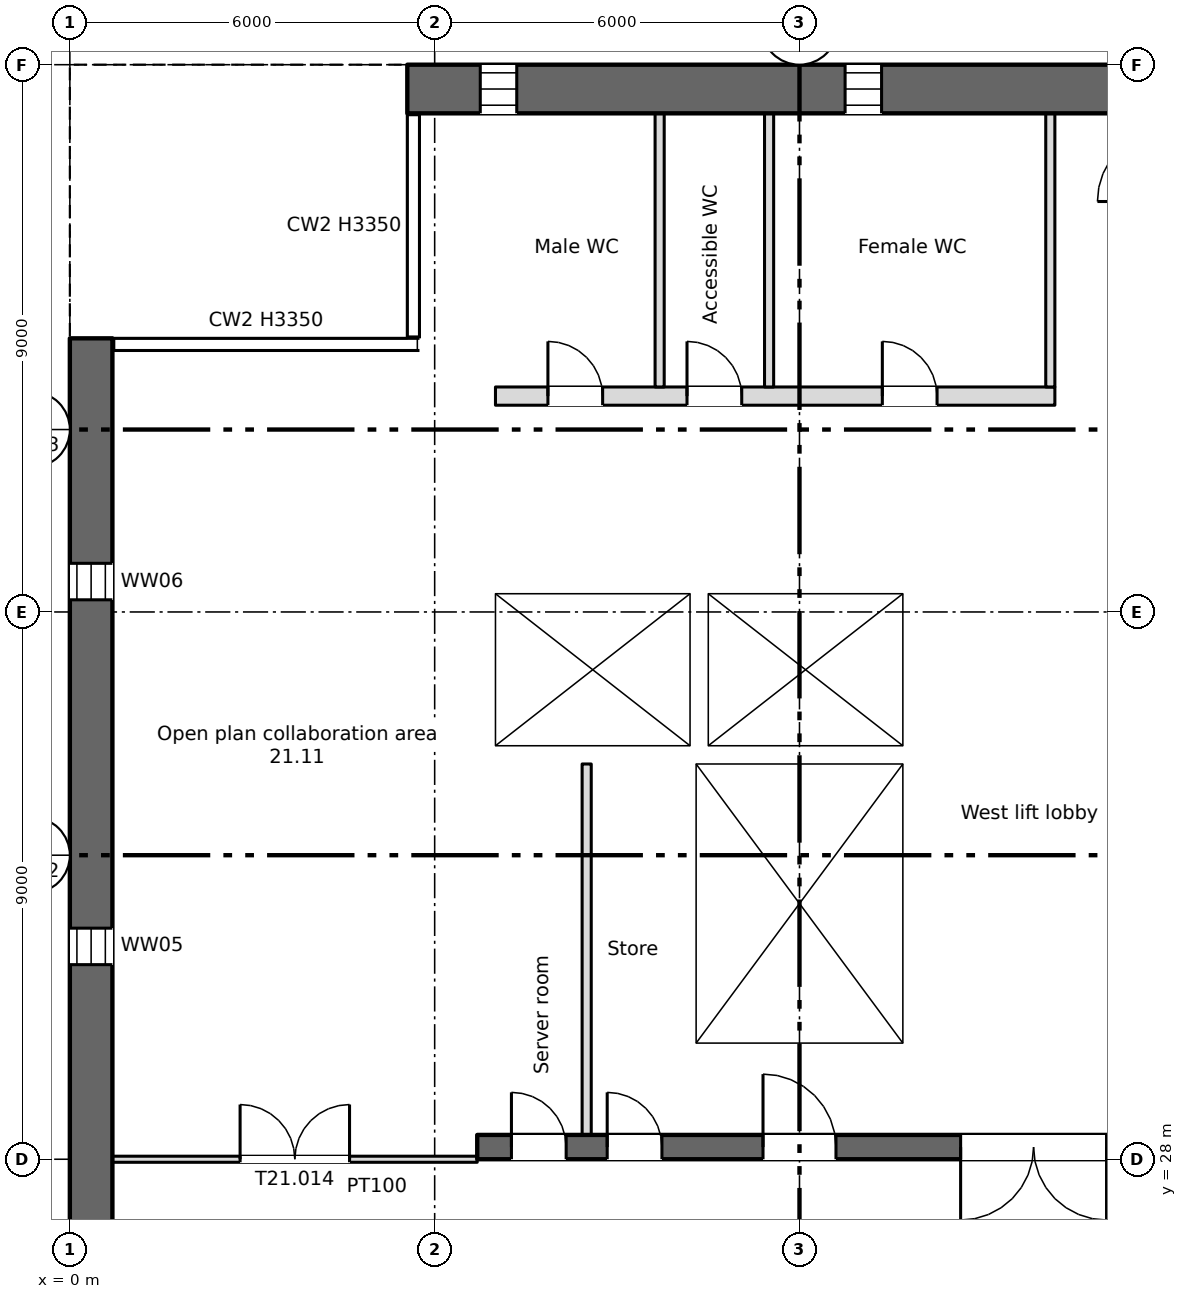
"""IFC4 building model, lengths in metres.
Left out: names, types, materials, properties, quantities, classifications, styles, units other than length and angle.
Written with IfcOpenShell. Run it as: python <this file> out.ifc"""

import sys

from ifc_helpers import new_model, si_unit, direction, frame, frame_2d, origin, place, context, subcontext, project, spatial, rectangle, extrude, element, fill, save


model = new_model("IFC4")
c1 = context("Model", 3, precision=1e-05, world=origin(), true_north=direction((0.0, 1.0)))
c2 = subcontext(c1, "Body", "Model", "MODEL_VIEW")
j1 = project(units=[si_unit("LENGTHUNIT", "METRE"), si_unit("PLANEANGLEUNIT", "RADIAN")], contexts=[c1])
p1 = place(None, origin())
s1 = spatial("IfcSite", under=j1, at=p1, CompositionType="ELEMENT")
p2 = place(p1, origin())
s2 = spatial("IfcBuilding", under=s1, at=p2, CompositionType="ELEMENT")
p3 = place(p2, frame((0.0, 0.0, 136.25)))
s3 = spatial("IfcBuildingStorey", under=s2, at=p3, CompositionType="ELEMENT", Elevation=136.25)
p4 = place(p3, frame((0.35, 6.0, 0.0), z_axis=(0.0, 0.0, 1.0), x_axis=(0.0, 1.0, 0.0)))
e1 = element("IfcWall", 1, at=p4, inside=s3, PredefinedType="SHEAR", context=c2, shape_type="SweptSolid", body=[
    extrude(rectangle(XDim=35.5, YDim=0.7, at=frame_2d((17.75, 0.0))), origin(), (0.0, 0.0, 1.0), 3.35),
])
p5 = place(p4, frame((1.2, 0.0, 0.6)))
e2 = element("IfcOpeningElement", 2, at=p5, cuts=e1, PredefinedType="OPENING", context=c2, shape_type="SweptSolid", body=[
    extrude(rectangle(XDim=0.6, YDim=2.4, at=frame_2d((0.3, 1.2))), frame((0.0, 0.36, 0.0), z_axis=(0.0, -1.0, 0.0), x_axis=(1.0, 0.0, 0.0)), (0.0, 0.0, 1.0), 0.72),
])
p6 = place(p4, frame((7.2, 0.0, 0.6)))
e3 = element("IfcOpeningElement", 3, at=p6, cuts=e1, PredefinedType="OPENING", context=c2, shape_type="SweptSolid", body=[
    extrude(rectangle(XDim=0.6, YDim=2.4, at=frame_2d((0.3, 1.2))), frame((0.0, 0.36, 0.0), z_axis=(0.0, -1.0, 0.0), x_axis=(1.0, 0.0, 0.0)), (0.0, 0.0, 1.0), 0.72),
])
p7 = place(p4, frame((13.2, 0.0, 0.6)))
e4 = element("IfcOpeningElement", 4, at=p7, cuts=e1, PredefinedType="OPENING", context=c2, shape_type="SweptSolid", body=[
    extrude(rectangle(XDim=0.6, YDim=2.4, at=frame_2d((0.3, 1.2))), frame((0.0, 0.36, 0.0), z_axis=(0.0, -1.0, 0.0), x_axis=(1.0, 0.0, 0.0)), (0.0, 0.0, 1.0), 0.72),
])
p8 = place(p4, frame((19.2, 0.0, 0.6)))
e5 = element("IfcOpeningElement", 5, at=p8, cuts=e1, PredefinedType="OPENING", context=c2, shape_type="SweptSolid", body=[
    extrude(rectangle(XDim=0.6, YDim=2.4, at=frame_2d((0.3, 1.2))), frame((0.0, 0.36, 0.0), z_axis=(0.0, -1.0, 0.0), x_axis=(1.0, 0.0, 0.0)), (0.0, 0.0, 1.0), 0.72),
])
p9 = place(p4, frame((25.2, 0.0, 0.6)))
e6 = element("IfcOpeningElement", 6, at=p9, cuts=e1, PredefinedType="OPENING", context=c2, shape_type="SweptSolid", body=[
    extrude(rectangle(XDim=0.6, YDim=2.4, at=frame_2d((0.3, 1.2))), frame((0.0, 0.36, 0.0), z_axis=(0.0, -1.0, 0.0), x_axis=(1.0, 0.0, 0.0)), (0.0, 0.0, 1.0), 0.72),
])
p10 = place(p4, frame((31.2, 0.0, 0.6)))
e7 = element("IfcOpeningElement", 7, at=p10, cuts=e1, PredefinedType="OPENING", context=c2, shape_type="SweptSolid", body=[
    extrude(rectangle(XDim=0.6, YDim=2.4, at=frame_2d((0.3, 1.2))), frame((0.0, 0.36, 0.0), z_axis=(0.0, -1.0, 0.0), x_axis=(1.0, 0.0, 0.0)), (0.0, 0.0, 1.0), 0.72),
])
p11 = place(p3, frame((5.55, 45.6, 0.0), z_axis=(0.0, 0.0, 1.0), x_axis=(1.0, 0.0, 0.0)))
e8 = element("IfcWall", 8, at=p11, inside=s3, PredefinedType="SHEAR", context=c2, shape_type="SweptSolid", body=[
    extrude(rectangle(XDim=60.9, YDim=0.8, at=frame_2d((30.45, 0.0))), origin(), (0.0, 0.0, 1.0), 3.35),
])
p12 = place(p11, frame((1.2, 0.0, 0.6)))
e9 = element("IfcOpeningElement", 9, at=p12, cuts=e8, PredefinedType="OPENING", context=c2, shape_type="SweptSolid", body=[
    extrude(rectangle(XDim=0.6, YDim=2.4, at=frame_2d((0.3, 1.2))), frame((0.0, 0.41, 0.0), z_axis=(0.0, -1.0, 0.0), x_axis=(1.0, 0.0, 0.0)), (0.0, 0.0, 1.0), 0.82),
])
p13 = place(p11, frame((7.2, 0.0, 0.6)))
e10 = element("IfcOpeningElement", 10, at=p13, cuts=e8, PredefinedType="OPENING", context=c2, shape_type="SweptSolid", body=[
    extrude(rectangle(XDim=0.6, YDim=2.4, at=frame_2d((0.3, 1.2))), frame((0.0, 0.41, 0.0), z_axis=(0.0, -1.0, 0.0), x_axis=(1.0, 0.0, 0.0)), (0.0, 0.0, 1.0), 0.82),
])
p14 = place(p11, frame((55.2, 0.0, 0.6)))
e11 = element("IfcOpeningElement", 11, at=p14, cuts=e8, PredefinedType="OPENING", context=c2, shape_type="SweptSolid", body=[
    extrude(rectangle(XDim=0.6, YDim=2.4, at=frame_2d((0.3, 1.2))), frame((0.0, 0.41, 0.0), z_axis=(0.0, -1.0, 0.0), x_axis=(1.0, 0.0, 0.0)), (0.0, 0.0, 1.0), 0.82),
])
p15 = place(p3, frame((6.7, 28.2, 0.0), z_axis=(0.0, 0.0, 1.0), x_axis=(1.0, 0.0, 0.0)))
e12 = element("IfcWall", 12, at=p15, inside=s3, PredefinedType="SHEAR", context=c2, shape_type="SweptSolid", body=[
    extrude(rectangle(XDim=57.8, YDim=0.4, at=frame_2d((28.9, 0.0))), origin(), (0.0, 0.0, 1.0), 3.35),
])
p16 = place(p15, frame((12.812, 0.0, 0.0)))
e13 = element("IfcOpeningElement", 13, at=p16, cuts=e12, PredefinedType="OPENING", context=c2, shape_type="SweptSolid", body=[
    extrude(rectangle(XDim=0.9, YDim=2.1, at=frame_2d((0.45, 1.05))), frame((0.0, 0.21, 0.0), z_axis=(0.0, -1.0, 0.0), x_axis=(1.0, 0.0, 0.0)), (0.0, 0.0, 1.0), 0.42),
])
p17 = place(p15, frame((15.387, 0.0, 0.0)))
e14 = element("IfcOpeningElement", 14, at=p17, cuts=e12, PredefinedType="OPENING", context=c2, shape_type="SweptSolid", body=[
    extrude(rectangle(XDim=0.9, YDim=2.1, at=frame_2d((0.45, 1.05))), frame((0.0, 0.21, 0.0), z_axis=(0.0, -1.0, 0.0), x_axis=(1.0, 0.0, 0.0)), (0.0, 0.0, 1.0), 0.42),
])
p18 = place(p15, frame((48.312, 0.0, 0.0)))
e15 = element("IfcOpeningElement", 15, at=p18, cuts=e12, PredefinedType="OPENING", context=c2, shape_type="SweptSolid", body=[
    extrude(rectangle(XDim=0.9, YDim=2.1, at=frame_2d((0.45, 1.05))), frame((0.0, 0.21, 0.0), z_axis=(0.0, -1.0, 0.0), x_axis=(1.0, 0.0, 0.0)), (0.0, 0.0, 1.0), 0.42),
])
p19 = place(p15, frame((50.887, 0.0, 0.0)))
e16 = element("IfcOpeningElement", 16, at=p19, cuts=e12, PredefinedType="OPENING", context=c2, shape_type="SweptSolid", body=[
    extrude(rectangle(XDim=0.9, YDim=2.1, at=frame_2d((0.45, 1.05))), frame((0.0, 0.21, 0.0), z_axis=(0.0, -1.0, 0.0), x_axis=(1.0, 0.0, 0.0)), (0.0, 0.0, 1.0), 0.42),
])
p20 = place(p15, frame((0.562, 0.0, 0.0)))
e17 = element("IfcOpeningElement", 17, at=p20, cuts=e12, PredefinedType="OPENING", context=c2, shape_type="SweptSolid", body=[
    extrude(rectangle(XDim=0.9, YDim=2.1, at=frame_2d((0.45, 1.05))), frame((0.0, 0.21, 0.0), z_axis=(0.0, -1.0, 0.0), x_axis=(1.0, 0.0, 0.0)), (0.0, 0.0, 1.0), 0.42),
])
p21 = place(p15, frame((2.137, 0.0, 0.0)))
e18 = element("IfcOpeningElement", 18, at=p21, cuts=e12, PredefinedType="OPENING", context=c2, shape_type="SweptSolid", body=[
    extrude(rectangle(XDim=0.9, YDim=2.1, at=frame_2d((0.45, 1.05))), frame((0.0, 0.21, 0.0), z_axis=(0.0, -1.0, 0.0), x_axis=(1.0, 0.0, 0.0)), (0.0, 0.0, 1.0), 0.42),
])
p22 = place(p15, frame((4.7, 0.0, 0.0)))
e19 = element("IfcOpeningElement", 19, at=p22, cuts=e12, PredefinedType="OPENING", context=c2, shape_type="SweptSolid", body=[
    extrude(rectangle(XDim=1.2, YDim=2.1, at=frame_2d((0.6, 1.05))), frame((0.0, 0.21, 0.0), z_axis=(0.0, -1.0, 0.0), x_axis=(1.0, 0.0, 0.0)), (0.0, 0.0, 1.0), 0.42),
])
p23 = place(p15, frame((31.7, 0.0, 0.0)))
e20 = element("IfcOpeningElement", 20, at=p23, cuts=e12, PredefinedType="OPENING", context=c2, shape_type="SweptSolid", body=[
    extrude(rectangle(XDim=1.2, YDim=2.1, at=frame_2d((0.6, 1.05))), frame((0.0, 0.21, 0.0), z_axis=(0.0, -1.0, 0.0), x_axis=(1.0, 0.0, 0.0)), (0.0, 0.0, 1.0), 0.42),
])
p24 = place(p15, frame((55.2, 0.0, 0.0)))
e21 = element("IfcOpeningElement", 21, at=p24, cuts=e12, PredefinedType="OPENING", context=c2, shape_type="SweptSolid", body=[
    extrude(rectangle(XDim=1.2, YDim=2.1, at=frame_2d((0.6, 1.05))), frame((0.0, 0.21, 0.0), z_axis=(0.0, -1.0, 0.0), x_axis=(1.0, 0.0, 0.0)), (0.0, 0.0, 1.0), 0.42),
])
p25 = place(p15, frame((21.7, 0.0, 0.0)))
e22 = element("IfcOpeningElement", 22, at=p25, cuts=e12, PredefinedType="OPENING", context=c2, shape_type="SweptSolid", body=[
    extrude(rectangle(XDim=1.2, YDim=2.1, at=frame_2d((0.6, 1.05))), frame((0.0, 0.21, 0.0), z_axis=(0.0, -1.0, 0.0), x_axis=(1.0, 0.0, 0.0)), (0.0, 0.0, 1.0), 0.42),
])
p26 = place(p15, frame((41.7, 0.0, 0.0)))
e23 = element("IfcOpeningElement", 23, at=p26, cuts=e12, PredefinedType="OPENING", context=c2, shape_type="SweptSolid", body=[
    extrude(rectangle(XDim=1.2, YDim=2.1, at=frame_2d((0.6, 1.05))), frame((0.0, 0.21, 0.0), z_axis=(0.0, -1.0, 0.0), x_axis=(1.0, 0.0, 0.0)), (0.0, 0.0, 1.0), 0.42),
])
p27 = place(p15, frame((24.85, 0.0, 0.0)))
e24 = element("IfcOpeningElement", 24, at=p27, cuts=e12, PredefinedType="OPENING", context=c2, shape_type="SweptSolid", body=[
    extrude(rectangle(XDim=2.4, YDim=2.1, at=frame_2d((1.2, 1.05))), frame((0.0, 0.21, 0.0), z_axis=(0.0, -1.0, 0.0), x_axis=(1.0, 0.0, 0.0)), (0.0, 0.0, 1.0), 0.42),
])
p28 = place(p15, frame((37.35, 0.0, 0.0)))
e25 = element("IfcOpeningElement", 25, at=p28, cuts=e12, PredefinedType="OPENING", context=c2, shape_type="SweptSolid", body=[
    extrude(rectangle(XDim=2.4, YDim=2.1, at=frame_2d((1.2, 1.05))), frame((0.0, 0.21, 0.0), z_axis=(0.0, -1.0, 0.0), x_axis=(1.0, 0.0, 0.0)), (0.0, 0.0, 1.0), 0.42),
])
p29 = place(p15, frame((7.95, 0.0, 0.0)))
e26 = element("IfcOpeningElement", 26, at=p29, cuts=e12, PredefinedType="OPENING", context=c2, shape_type="SweptSolid", body=[
    extrude(rectangle(XDim=2.4, YDim=2.1, at=frame_2d((1.2, 1.05))), frame((0.0, 0.21, 0.0), z_axis=(0.0, -1.0, 0.0), x_axis=(1.0, 0.0, 0.0)), (0.0, 0.0, 1.0), 0.42),
])
p30 = place(p15, frame((28.85, 0.0, 0.0)))
e27 = element("IfcOpeningElement", 27, at=p30, cuts=e12, PredefinedType="OPENING", context=c2, shape_type="SweptSolid", body=[
    extrude(rectangle(XDim=0.9, YDim=2.1, at=frame_2d((0.45, 1.05))), frame((0.0, 0.21, 0.0), z_axis=(0.0, -1.0, 0.0), x_axis=(1.0, 0.0, 0.0)), (0.0, 0.0, 1.0), 0.42),
])
p31 = place(p15, frame((34.85, 0.0, 0.0)))
e28 = element("IfcOpeningElement", 28, at=p31, cuts=e12, PredefinedType="OPENING", context=c2, shape_type="SweptSolid", body=[
    extrude(rectangle(XDim=0.9, YDim=2.1, at=frame_2d((0.45, 1.05))), frame((0.0, 0.21, 0.0), z_axis=(0.0, -1.0, 0.0), x_axis=(1.0, 0.0, 0.0)), (0.0, 0.0, 1.0), 0.42),
])
p32 = place(p3, frame((6.85, 28.4, 0.0), z_axis=(0.0, 0.0, 1.0), x_axis=(0.0, 1.0, 0.0)))
e29 = element("IfcWall", 29, at=p32, inside=s3, PredefinedType="SHEAR", context=c2, shape_type="SweptSolid", body=[
    extrude(rectangle(XDim=16.8, YDim=0.3, at=frame_2d((8.4, 0.0))), origin(), (0.0, 0.0, 1.0), 3.35),
])
for number, where, z_axis, x_axis in (
    (30, (10.15, 28.4, 0.0), (0.0, 0.0, 1.0), (0.0, 1.0, 0.0)),
    (31, (13.85, 28.4, 0.0), (0.0, 0.0, 1.0), (0.0, 1.0, 0.0)),
):
    element("IfcWall", number, at=place(p3, frame(where, z_axis=z_axis, x_axis=x_axis)), inside=s3, PredefinedType="SHEAR", context=c2, shape_type="SweptSolid", body=[
        extrude(rectangle(XDim=6.1, YDim=0.3, at=frame_2d((3.05, 0.0))), origin(), (0.0, 0.0, 1.0), 3.35),
    ])
for number, where, z_axis, x_axis in (
    (32, (7.0, 34.65, 0.0), (0.0, 0.0, 1.0), (1.0, 0.0, 0.0)),
    (33, (7.0, 37.45, 0.0), (0.0, 0.0, 1.0), (1.0, 0.0, 0.0)),
):
    element("IfcWall", number, at=place(p3, frame(where, z_axis=z_axis, x_axis=x_axis)), inside=s3, PredefinedType="SHEAR", context=c2, shape_type="SweptSolid", body=[
        extrude(rectangle(XDim=7.0, YDim=0.3, at=frame_2d((3.5, 0.0))), origin(), (0.0, 0.0, 1.0), 3.35),
    ])
p33 = place(p3, frame((13.85, 34.8, 0.0), z_axis=(0.0, 0.0, 1.0), x_axis=(0.0, 1.0, 0.0)))
e34 = element("IfcWall", 34, at=p33, inside=s3, PredefinedType="SHEAR", context=c2, shape_type="SweptSolid", body=[
    extrude(rectangle(XDim=2.5, YDim=0.3, at=frame_2d((1.25, 0.0))), origin(), (0.0, 0.0, 1.0), 3.35),
])
p34 = place(p3, frame((7.0, 40.55, 0.0), z_axis=(0.0, 0.0, 1.0), x_axis=(1.0, 0.0, 0.0)))
e35 = element("IfcWall", 35, at=p34, inside=s3, PredefinedType="PARTITIONING", context=c2, shape_type="SweptSolid", body=[
    extrude(rectangle(XDim=9.2, YDim=0.3, at=frame_2d((4.6, 0.0))), origin(), (0.0, 0.0, 1.0), 3.35),
])
p35 = place(p34, frame((0.863, 0.0, 0.0)))
e36 = element("IfcOpeningElement", 36, at=p35, cuts=e35, PredefinedType="OPENING", context=c2, shape_type="SweptSolid", body=[
    extrude(rectangle(XDim=0.9, YDim=2.1, at=frame_2d((0.45, 1.05))), frame((0.0, 0.16, 0.0), z_axis=(0.0, -1.0, 0.0), x_axis=(1.0, 0.0, 0.0)), (0.0, 0.0, 1.0), 0.32),
])
p36 = place(p34, frame((3.15, 0.0, 0.0)))
e37 = element("IfcOpeningElement", 37, at=p36, cuts=e35, PredefinedType="OPENING", context=c2, shape_type="SweptSolid", body=[
    extrude(rectangle(XDim=0.9, YDim=2.1, at=frame_2d((0.45, 1.05))), frame((0.0, 0.16, 0.0), z_axis=(0.0, -1.0, 0.0), x_axis=(1.0, 0.0, 0.0)), (0.0, 0.0, 1.0), 0.32),
])
p37 = place(p34, frame((6.363, 0.0, 0.0)))
e38 = element("IfcOpeningElement", 38, at=p37, cuts=e35, PredefinedType="OPENING", context=c2, shape_type="SweptSolid", body=[
    extrude(rectangle(XDim=0.9, YDim=2.1, at=frame_2d((0.45, 1.05))), frame((0.0, 0.16, 0.0), z_axis=(0.0, -1.0, 0.0), x_axis=(1.0, 0.0, 0.0)), (0.0, 0.0, 1.0), 0.32),
])
p38 = place(p3, frame((10.35, 34.8, 0.0), z_axis=(0.0, 0.0, 1.0), x_axis=(0.0, 1.0, 0.0)))
e39 = element("IfcWall", 39, at=p38, inside=s3, PredefinedType="SHEAR", context=c2, shape_type="SweptSolid", body=[
    extrude(rectangle(XDim=2.5, YDim=0.3, at=frame_2d((1.25, 0.0))), origin(), (0.0, 0.0, 1.0), 3.35),
])
p39 = place(p3, frame((16.125, 40.7, 0.0), z_axis=(0.0, 0.0, 1.0), x_axis=(0.0, 1.0, 0.0)))
e40 = element("IfcWall", 40, at=p39, inside=s3, PredefinedType="PARTITIONING", context=c2, shape_type="SweptSolid", body=[
    extrude(rectangle(XDim=4.5, YDim=0.15, at=frame_2d((2.25, 0.0))), origin(), (0.0, 0.0, 1.0), 3.35),
])
p40 = place(p3, frame((8.5, 28.4, 0.0), z_axis=(0.0, 0.0, 1.0), x_axis=(0.0, 1.0, 0.0)))
e41 = element("IfcWall", 41, at=p40, inside=s3, PredefinedType="PARTITIONING", context=c2, shape_type="SweptSolid", body=[
    extrude(rectangle(XDim=6.1, YDim=0.15, at=frame_2d((3.05, 0.0))), origin(), (0.0, 0.0, 1.0), 3.35),
])
for number, where, z_axis, x_axis in (
    (42, (9.7, 40.7, 0.0), (0.0, 0.0, 1.0), (0.0, 1.0, 0.0)),
    (43, (11.5, 40.7, 0.0), (0.0, 0.0, 1.0), (0.0, 1.0, 0.0)),
):
    element("IfcWall", number, at=place(p3, frame(where, z_axis=z_axis, x_axis=x_axis)), inside=s3, PredefinedType="PARTITIONING", context=c2, shape_type="SweptSolid", body=[
        extrude(rectangle(XDim=4.5, YDim=0.15, at=frame_2d((2.25, 0.0))), origin(), (0.0, 0.0, 1.0), 3.35),
    ])
p41 = place(p3, frame((0.7, 28.0, 0.0), z_axis=(0.0, 0.0, 1.0), x_axis=(1.0, 0.0, 0.0)))
e44 = element("IfcWall", 44, at=p41, inside=s3, PredefinedType="PARTITIONING", context=c2, shape_type="SweptSolid", body=[
    extrude(rectangle(XDim=6.0, YDim=0.1, at=frame_2d((3.0, 0.0))), origin(), (0.0, 0.0, 1.0), 3.35),
])
p42 = place(p41, frame((2.1, 0.0, 0.0)))
e45 = element("IfcOpeningElement", 45, at=p42, cuts=e44, PredefinedType="OPENING", context=c2, shape_type="SweptSolid", body=[
    extrude(rectangle(XDim=1.8, YDim=2.1, at=frame_2d((0.9, 1.05))), frame((0.0, 0.06, 0.0), z_axis=(0.0, -1.0, 0.0), x_axis=(1.0, 0.0, 0.0)), (0.0, 0.0, 1.0), 0.12),
])
p43 = place(p12, origin())
e46 = element("IfcWindow", 46, at=p43, inside=s3, PartitioningType="SINGLE_PANEL", PredefinedType="WINDOW", context=c2, shape_type="SweptSolid", body=[
    extrude(rectangle(XDim=0.6, YDim=2.4, at=frame_2d((0.3, 1.2))), frame((0.0, 0.03, 0.0), z_axis=(0.0, -1.0, 0.0), x_axis=(1.0, 0.0, 0.0)), (0.0, 0.0, 1.0), 0.06),
])
fill(e9, e46)
p44 = place(p13, origin())
e47 = element("IfcWindow", 47, at=p44, inside=s3, PartitioningType="SINGLE_PANEL", PredefinedType="WINDOW", context=c2, shape_type="SweptSolid", body=[
    extrude(rectangle(XDim=0.6, YDim=2.4, at=frame_2d((0.3, 1.2))), frame((0.0, 0.03, 0.0), z_axis=(0.0, -1.0, 0.0), x_axis=(1.0, 0.0, 0.0)), (0.0, 0.0, 1.0), 0.06),
])
fill(e10, e47)
p45 = place(p9, origin())
e48 = element("IfcWindow", 48, at=p45, inside=s3, PartitioningType="SINGLE_PANEL", PredefinedType="WINDOW", context=c2, shape_type="SweptSolid", body=[
    extrude(rectangle(XDim=0.6, YDim=2.4, at=frame_2d((0.3, 1.2))), frame((0.0, 0.03, 0.0), z_axis=(0.0, -1.0, 0.0), x_axis=(1.0, 0.0, 0.0)), (0.0, 0.0, 1.0), 0.06),
])
fill(e6, e48)
p46 = place(p10, origin())
e49 = element("IfcWindow", 49, at=p46, inside=s3, PartitioningType="SINGLE_PANEL", PredefinedType="WINDOW", context=c2, shape_type="SweptSolid", body=[
    extrude(rectangle(XDim=0.6, YDim=2.4, at=frame_2d((0.3, 1.2))), frame((0.0, 0.03, 0.0), z_axis=(0.0, -1.0, 0.0), x_axis=(1.0, 0.0, 0.0)), (0.0, 0.0, 1.0), 0.06),
])
fill(e7, e49)
p47 = place(p20, origin())
e50 = element("IfcDoor", 50, at=p47, inside=s3, OperationType="SINGLE_SWING_LEFT", PredefinedType="DOOR", context=c2, shape_type="SweptSolid", body=[
    extrude(rectangle(XDim=0.9, YDim=2.1, at=frame_2d((0.45, 1.05))), frame((0.0, 0.025, 0.0), z_axis=(0.0, -1.0, 0.0), x_axis=(1.0, 0.0, 0.0)), (0.0, 0.0, 1.0), 0.05),
])
fill(e17, e50)
p48 = place(p21, origin())
e51 = element("IfcDoor", 51, at=p48, inside=s3, OperationType="SINGLE_SWING_LEFT", PredefinedType="DOOR", context=c2, shape_type="SweptSolid", body=[
    extrude(rectangle(XDim=0.9, YDim=2.1, at=frame_2d((0.45, 1.05))), frame((0.0, 0.025, 0.0), z_axis=(0.0, -1.0, 0.0), x_axis=(1.0, 0.0, 0.0)), (0.0, 0.0, 1.0), 0.05),
])
fill(e18, e51)
p49 = place(p35, origin())
e52 = element("IfcDoor", 52, at=p49, inside=s3, OperationType="SINGLE_SWING_LEFT", PredefinedType="DOOR", context=c2, shape_type="SweptSolid", body=[
    extrude(rectangle(XDim=0.9, YDim=2.1, at=frame_2d((0.45, 1.05))), frame((0.0, 0.025, 0.0), z_axis=(0.0, -1.0, 0.0), x_axis=(1.0, 0.0, 0.0)), (0.0, 0.0, 1.0), 0.05),
])
fill(e36, e52)
p50 = place(p36, origin())
e53 = element("IfcDoor", 53, at=p50, inside=s3, OperationType="SINGLE_SWING_LEFT", PredefinedType="DOOR", context=c2, shape_type="SweptSolid", body=[
    extrude(rectangle(XDim=0.9, YDim=2.1, at=frame_2d((0.45, 1.05))), frame((0.0, 0.025, 0.0), z_axis=(0.0, -1.0, 0.0), x_axis=(1.0, 0.0, 0.0)), (0.0, 0.0, 1.0), 0.05),
])
fill(e37, e53)
p51 = place(p37, origin())
e54 = element("IfcDoor", 54, at=p51, inside=s3, OperationType="SINGLE_SWING_LEFT", PredefinedType="DOOR", context=c2, shape_type="SweptSolid", body=[
    extrude(rectangle(XDim=0.9, YDim=2.1, at=frame_2d((0.45, 1.05))), frame((0.0, 0.025, 0.0), z_axis=(0.0, -1.0, 0.0), x_axis=(1.0, 0.0, 0.0)), (0.0, 0.0, 1.0), 0.05),
])
fill(e38, e54)
p52 = place(p22, origin())
e55 = element("IfcDoor", 55, at=p52, inside=s3, OperationType="SINGLE_SWING_LEFT", PredefinedType="DOOR", context=c2, shape_type="SweptSolid", body=[
    extrude(rectangle(XDim=1.2, YDim=2.1, at=frame_2d((0.6, 1.05))), frame((0.0, 0.025, 0.0), z_axis=(0.0, -1.0, 0.0), x_axis=(1.0, 0.0, 0.0)), (0.0, 0.0, 1.0), 0.05),
])
fill(e19, e55)
p53 = place(p29, origin())
e56 = element("IfcDoor", 56, at=p53, inside=s3, OperationType="DOUBLE_DOOR_SINGLE_SWING", PredefinedType="DOOR", context=c2, shape_type="SweptSolid", body=[
    extrude(rectangle(XDim=2.4, YDim=2.1, at=frame_2d((1.2, 1.05))), frame((0.0, 0.025, 0.0), z_axis=(0.0, -1.0, 0.0), x_axis=(1.0, 0.0, 0.0)), (0.0, 0.0, 1.0), 0.05),
])
fill(e26, e56)
p54 = place(p42, origin())
e57 = element("IfcDoor", 57, at=p54, inside=s3, OperationType="DOUBLE_DOOR_SINGLE_SWING", PredefinedType="DOOR", context=c2, shape_type="SweptSolid", body=[
    extrude(rectangle(XDim=1.8, YDim=2.1, at=frame_2d((0.9, 1.05))), frame((0.0, 0.025, 0.0), z_axis=(0.0, -1.0, 0.0), x_axis=(1.0, 0.0, 0.0)), (0.0, 0.0, 1.0), 0.05),
])
fill(e45, e57)
save(model, sys.argv[1])
